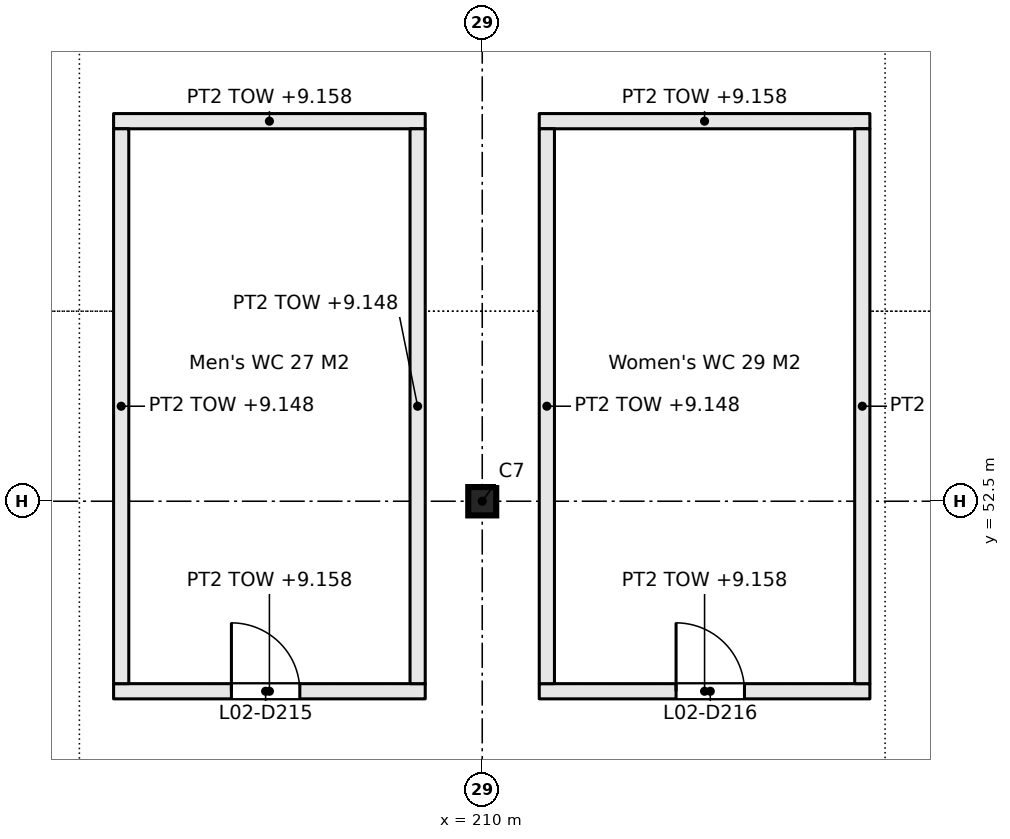
"""IFC4 building model, lengths in metres.
Left out: names, types, materials, properties, quantities, classifications, styles, units other than length and angle.
Written with IfcOpenShell. Run it as: python <this file> out.ifc"""

import sys

from ifc_helpers import new_model, si_unit, direction, frame, frame_2d, origin, origin_2d, place, context, subcontext, project, spatial, rectangle, i_section, extrude, element, fill, save


model = new_model("IFC4")
c1 = context("Model", 3, precision=1e-05, world=origin(), true_north=direction((0.0, 1.0)))
c2 = subcontext(c1, "Body", "Model", "MODEL_VIEW")
j1 = project(units=[si_unit("LENGTHUNIT", "METRE"), si_unit("PLANEANGLEUNIT", "RADIAN")], contexts=[c1])
p1 = place(None, origin())
s1 = spatial("IfcSite", under=j1, at=p1, CompositionType="ELEMENT")
p2 = place(p1, origin())
s2 = spatial("IfcBuilding", under=s1, at=p2, CompositionType="ELEMENT")
p3 = place(p2, frame((0.0, 0.0, 6.6)))
s3 = spatial("IfcBuildingStorey", under=s2, at=p3, CompositionType="ELEMENT", Elevation=6.6)
p4 = place(p3, frame((210.0, 52.5, 0.0), z_axis=(0.0, 0.0, 1.0), x_axis=(0.0, 1.0, 0.0)))
e1 = element("IfcColumn", 1, at=p4, inside=s3, PredefinedType="COLUMN", context=c2, shape_type="SweptSolid", body=[
    extrude(i_section(OverallWidth=0.373, OverallDepth=0.368, WebThickness=0.015, FlangeThickness=0.024, FilletRadius=0.015, at=origin_2d()), origin(), (0.0, 0.0, 1.0), 3.3),
])
p5 = place(p3, frame((205.15, 50.0, 0.0), z_axis=(0.0, 0.0, 1.0), x_axis=(1.0, 0.0, 0.0)))
e2 = element("IfcWall", 2, at=p5, inside=s3, PredefinedType="PARTITIONING", context=c2, shape_type="SweptSolid", body=[
    extrude(rectangle(XDim=4.1, YDim=0.2, at=frame_2d((2.05, 0.0))), origin(), (0.0, 0.0, 1.0), 2.558),
])
p6 = place(p5, frame((1.55, 0.0, 0.0)))
e3 = element("IfcOpeningElement", 3, at=p6, cuts=e2, PredefinedType="OPENING", context=c2, shape_type="SweptSolid", body=[
    extrude(rectangle(XDim=0.9, YDim=2.1, at=frame_2d((0.45, 1.05))), frame((0.0, 0.11, 0.0), z_axis=(0.0, -1.0, 0.0), x_axis=(1.0, 0.0, 0.0)), (0.0, 0.0, 1.0), 0.22),
])
p7 = place(p3, frame((210.75, 50.0, 0.0), z_axis=(0.0, 0.0, 1.0), x_axis=(1.0, 0.0, 0.0)))
e4 = element("IfcWall", 4, at=p7, inside=s3, PredefinedType="PARTITIONING", context=c2, shape_type="SweptSolid", body=[
    extrude(rectangle(XDim=4.35, YDim=0.2, at=frame_2d((2.175, 0.0))), origin(), (0.0, 0.0, 1.0), 2.558),
])
p8 = place(p7, frame((1.8, 0.0, 0.0)))
e5 = element("IfcOpeningElement", 5, at=p8, cuts=e4, PredefinedType="OPENING", context=c2, shape_type="SweptSolid", body=[
    extrude(rectangle(XDim=0.9, YDim=2.1, at=frame_2d((0.45, 1.05))), frame((0.0, 0.11, 0.0), z_axis=(0.0, -1.0, 0.0), x_axis=(1.0, 0.0, 0.0)), (0.0, 0.0, 1.0), 0.22),
])
p9 = place(p3, frame((205.15, 57.5, 0.0), z_axis=(0.0, 0.0, 1.0), x_axis=(1.0, 0.0, 0.0)))
e6 = element("IfcWall", 6, at=p9, inside=s3, PredefinedType="PARTITIONING", context=c2, shape_type="SweptSolid", body=[
    extrude(rectangle(XDim=4.1, YDim=0.2, at=frame_2d((2.05, 0.0))), origin(), (0.0, 0.0, 1.0), 2.558),
])
p10 = place(p3, frame((210.75, 57.5, 0.0), z_axis=(0.0, 0.0, 1.0), x_axis=(1.0, 0.0, 0.0)))
e7 = element("IfcWall", 7, at=p10, inside=s3, PredefinedType="PARTITIONING", context=c2, shape_type="SweptSolid", body=[
    extrude(rectangle(XDim=4.35, YDim=0.2, at=frame_2d((2.175, 0.0))), origin(), (0.0, 0.0, 1.0), 2.558),
])
for number, where, z_axis, x_axis in (
    (8, (205.25, 50.1, 0.0), (0.0, 0.0, 1.0), (0.0, 1.0, 0.0)),
    (9, (209.15, 50.1, 0.0), (0.0, 0.0, 1.0), (0.0, 1.0, 0.0)),
    (10, (210.85, 50.1, 0.0), (0.0, 0.0, 1.0), (0.0, 1.0, 0.0)),
    (11, (215.0, 50.1, 0.0), (0.0, 0.0, 1.0), (0.0, 1.0, 0.0)),
):
    element("IfcWall", number, at=place(p3, frame(where, z_axis=z_axis, x_axis=x_axis)), inside=s3, PredefinedType="PARTITIONING", context=c2, shape_type="SweptSolid", body=[
        extrude(rectangle(XDim=7.3, YDim=0.2, at=frame_2d((3.65, 0.0))), origin(), (0.0, 0.0, 1.0), 2.548),
    ])
p11 = place(p6, origin())
e12 = element("IfcDoor", 12, at=p11, inside=s3, OperationType="SINGLE_SWING_LEFT", PredefinedType="DOOR", context=c2, shape_type="SweptSolid", body=[
    extrude(rectangle(XDim=0.9, YDim=2.1, at=frame_2d((0.45, 1.05))), frame((0.0, 0.025, 0.0), z_axis=(0.0, -1.0, 0.0), x_axis=(1.0, 0.0, 0.0)), (0.0, 0.0, 1.0), 0.05),
])
fill(e3, e12)
p12 = place(p8, origin())
e13 = element("IfcDoor", 13, at=p12, inside=s3, OperationType="SINGLE_SWING_RIGHT", PredefinedType="DOOR", context=c2, shape_type="SweptSolid", body=[
    extrude(rectangle(XDim=0.9, YDim=2.1, at=frame_2d((0.45, 1.05))), frame((0.0, 0.025, 0.0), z_axis=(0.0, -1.0, 0.0), x_axis=(1.0, 0.0, 0.0)), (0.0, 0.0, 1.0), 0.05),
])
fill(e5, e13)
save(model, sys.argv[1])
